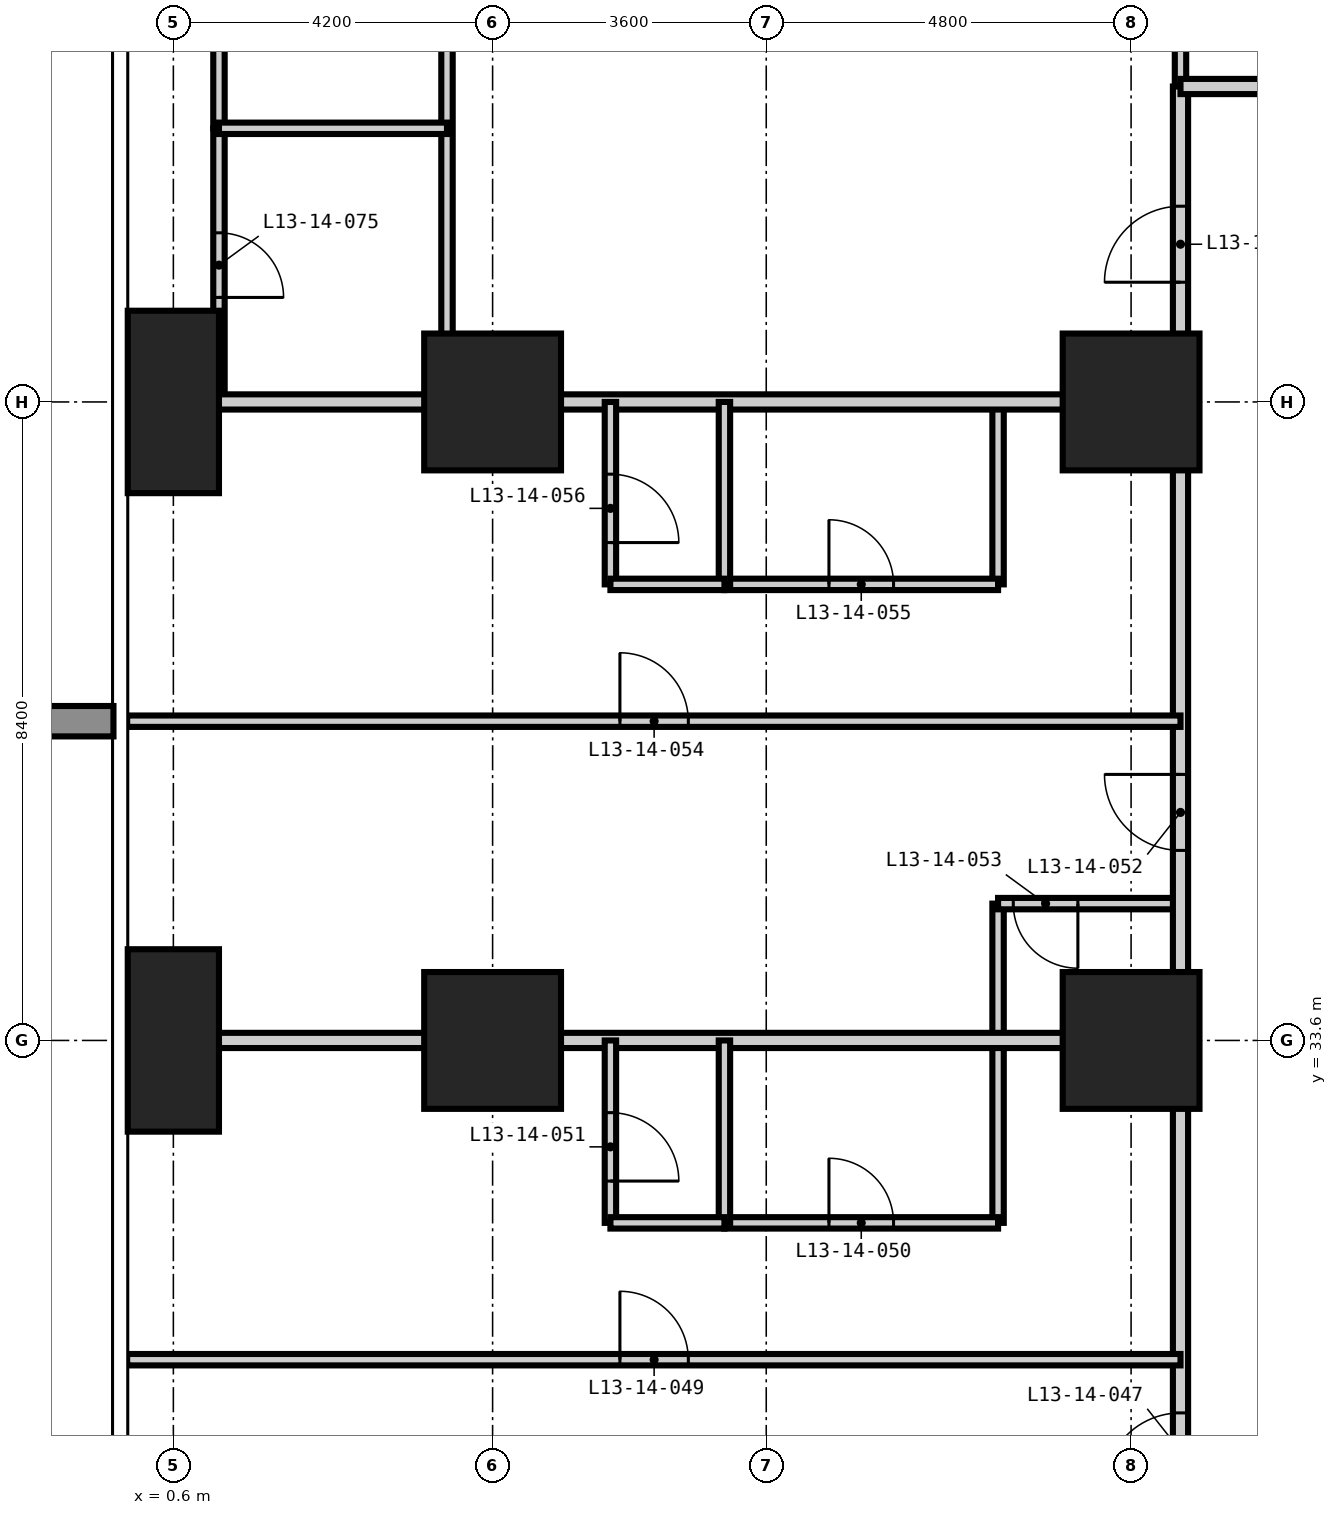
"""IFC4 building model, lengths in metres.
Left out: names, types, materials, properties, quantities, classifications, styles, units other than length and angle.
Written with IfcOpenShell. Run it as: python <this file> out.ifc"""

import sys

from ifc_helpers import new_model, si_unit, direction, frame, frame_2d, origin, origin_2d, place, context, subcontext, project, spatial, rectangle, extrude, element, fill, save


model = new_model("IFC4")
c1 = context("Model", 3, precision=1e-05, world=origin(), true_north=direction((0.0, 1.0)))
c2 = subcontext(c1, "Body", "Model", "MODEL_VIEW")
j1 = project(units=[si_unit("LENGTHUNIT", "METRE"), si_unit("PLANEANGLEUNIT", "RADIAN")], contexts=[c1])
p1 = place(None, origin())
s1 = spatial("IfcSite", under=j1, at=p1, CompositionType="ELEMENT")
p2 = place(p1, origin())
s2 = spatial("IfcBuilding", under=s1, at=p2, CompositionType="ELEMENT")
p3 = place(p2, frame((0.0, 0.0, 55.8)))
s3 = spatial("IfcBuildingStorey", under=s2, at=p3, CompositionType="ELEMENT", Elevation=55.8)
for number, where, z_axis, x_axis in (
    (1, (0.6, 33.6, -0.35), (0.0, 0.0, 1.0), (1.0, 0.0, 0.0)),
    (2, (0.6, 42.0, -0.35), (0.0, 0.0, 1.0), (1.0, 0.0, 0.0)),
):
    element("IfcColumn", number, at=place(p3, frame(where, z_axis=z_axis, x_axis=x_axis)), inside=s3, PredefinedType="COLUMN", context=c2, shape_type="SweptSolid", body=[
        extrude(rectangle(XDim=1.2, YDim=2.4, at=origin_2d()), origin(), (0.0, 0.0, 1.0), 3.6),
    ])
for number, where, z_axis, x_axis in (
    (3, (4.8, 33.6, -0.35), (0.0, 0.0, 1.0), (1.0, 0.0, 0.0)),
    (4, (4.8, 42.0, -0.35), (0.0, 0.0, 1.0), (1.0, 0.0, 0.0)),
    (5, (13.2, 33.6, -0.35), (0.0, 0.0, 1.0), (1.0, 0.0, 0.0)),
    (6, (13.2, 42.0, -0.35), (0.0, 0.0, 1.0), (1.0, 0.0, 0.0)),
):
    element("IfcColumn", number, at=place(p3, frame(where, z_axis=z_axis, x_axis=x_axis)), inside=s3, PredefinedType="COLUMN", context=c2, shape_type="SweptSolid", body=[
        extrude(rectangle(XDim=1.8, YDim=1.8, at=origin_2d()), origin(), (0.0, 0.0, 1.0), 3.6),
    ])
p4 = place(p3, frame((1.2, 42.0, 0.0), z_axis=(0.0, 0.0, 1.0), x_axis=(0.0, 1.0, 0.0)))
e7 = element("IfcWall", 7, at=p4, inside=s3, PredefinedType="PARTITIONING", context=c2, shape_type="SweptSolid", body=[
    extrude(rectangle(XDim=3.6, YDim=0.15, at=frame_2d((1.8, 0.0))), origin(), (0.0, 0.0, 1.0), 3.25),
])
p5 = place(p4, frame((1.375, 0.0, 0.0)))
e8 = element("IfcOpeningElement", 8, at=p5, cuts=e7, PredefinedType="OPENING", context=c2, shape_type="SweptSolid", body=[
    extrude(rectangle(XDim=0.85, YDim=2.1, at=frame_2d((0.425, 1.05))), frame((0.0, 0.085, 0.0), z_axis=(0.0, -1.0, 0.0), x_axis=(1.0, 0.0, 0.0)), (0.0, 0.0, 1.0), 0.17),
])
p6 = place(p3, frame((11.45, 31.2, 0.0), z_axis=(0.0, 0.0, 1.0), x_axis=(0.0, 1.0, 0.0)))
e9 = element("IfcWall", 9, at=p6, inside=s3, PredefinedType="PARTITIONING", context=c2, shape_type="SweptSolid", body=[
    extrude(rectangle(XDim=4.2, YDim=0.15, at=frame_2d((2.1, 0.0))), origin(), (0.0, 0.0, 1.0), 3.25),
])
p7 = place(p3, frame((11.45, 39.6, 0.0), z_axis=(0.0, 0.0, 1.0), x_axis=(0.0, 1.0, 0.0)))
e10 = element("IfcWall", 10, at=p7, inside=s3, PredefinedType="PARTITIONING", context=c2, shape_type="SweptSolid", body=[
    extrude(rectangle(XDim=2.4, YDim=0.15, at=frame_2d((1.2, 0.0))), origin(), (0.0, 0.0, 1.0), 3.25),
])
p8 = place(p3, frame((13.85, 46.15, 0.0), z_axis=(0.0, 0.0, 1.0), x_axis=(0.0, 1.0, 0.0)))
e11 = element("IfcWall", 11, at=p8, inside=s3, PredefinedType="PARTITIONING", context=c2, shape_type="SweptSolid", body=[
    extrude(rectangle(XDim=3.0, YDim=0.15, at=frame_2d((1.5, 0.0))), origin(), (0.0, 0.0, 1.0), 3.25),
])
p9 = place(p8, frame((1.075, 0.0, 0.0)))
e12 = element("IfcOpeningElement", 12, at=p9, cuts=e11, PredefinedType="OPENING", context=c2, shape_type="SweptSolid", body=[
    extrude(rectangle(XDim=0.85, YDim=2.1, at=frame_2d((0.425, 1.05))), frame((0.0, 0.085, 0.0), z_axis=(0.0, -1.0, 0.0), x_axis=(1.0, 0.0, 0.0)), (0.0, 0.0, 1.0), 0.17),
])
p10 = place(p3, frame((7.85, 31.2, 0.0), z_axis=(0.0, 0.0, 1.0), x_axis=(1.0, 0.0, 0.0)))
e13 = element("IfcWall", 13, at=p10, inside=s3, PredefinedType="PARTITIONING", context=c2, shape_type="SweptSolid", body=[
    extrude(rectangle(XDim=3.6, YDim=0.15, at=frame_2d((1.8, 0.0))), origin(), (0.0, 0.0, 1.0), 3.25),
])
p11 = place(p10, frame((1.375, 0.0, 0.0)))
e14 = element("IfcOpeningElement", 14, at=p11, cuts=e13, PredefinedType="OPENING", context=c2, shape_type="SweptSolid", body=[
    extrude(rectangle(XDim=0.85, YDim=2.1, at=frame_2d((0.425, 1.05))), frame((0.0, 0.085, 0.0), z_axis=(0.0, -1.0, 0.0), x_axis=(1.0, 0.0, 0.0)), (0.0, 0.0, 1.0), 0.17),
])
p12 = place(p3, frame((11.45, 35.4, 0.0), z_axis=(0.0, 0.0, 1.0), x_axis=(1.0, 0.0, 0.0)))
e15 = element("IfcWall", 15, at=p12, inside=s3, PredefinedType="PARTITIONING", context=c2, shape_type="SweptSolid", body=[
    extrude(rectangle(XDim=2.4, YDim=0.15, at=frame_2d((1.2, 0.0))), origin(), (0.0, 0.0, 1.0), 3.25),
])
p13 = place(p12, frame((0.2, 0.0, 0.0)))
e16 = element("IfcOpeningElement", 16, at=p13, cuts=e15, PredefinedType="OPENING", context=c2, shape_type="SweptSolid", body=[
    extrude(rectangle(XDim=0.85, YDim=2.1, at=frame_2d((0.425, 1.05))), frame((0.0, 0.085, 0.0), z_axis=(0.0, -1.0, 0.0), x_axis=(1.0, 0.0, 0.0)), (0.0, 0.0, 1.0), 0.17),
])
p14 = place(p3, frame((7.85, 39.6, 0.0), z_axis=(0.0, 0.0, 1.0), x_axis=(1.0, 0.0, 0.0)))
e17 = element("IfcWall", 17, at=p14, inside=s3, PredefinedType="PARTITIONING", context=c2, shape_type="SweptSolid", body=[
    extrude(rectangle(XDim=3.6, YDim=0.15, at=frame_2d((1.8, 0.0))), origin(), (0.0, 0.0, 1.0), 3.25),
])
p15 = place(p14, frame((1.375, 0.0, 0.0)))
e18 = element("IfcOpeningElement", 18, at=p15, cuts=e17, PredefinedType="OPENING", context=c2, shape_type="SweptSolid", body=[
    extrude(rectangle(XDim=0.85, YDim=2.1, at=frame_2d((0.425, 1.05))), frame((0.0, 0.085, 0.0), z_axis=(0.0, -1.0, 0.0), x_axis=(1.0, 0.0, 0.0)), (0.0, 0.0, 1.0), 0.17),
])
p16 = place(p3, frame((13.85, 13.85, 0.0), z_axis=(0.0, 0.0, 1.0), x_axis=(0.0, 1.0, 0.0)))
e19 = element("IfcWall", 19, at=p16, inside=s3, PredefinedType="PARTITIONING", context=c2, shape_type="SweptSolid", body=[
    extrude(rectangle(XDim=32.3, YDim=0.2, at=frame_2d((16.15, 0.0))), origin(), (0.0, 0.0, 1.0), 3.25),
])
p17 = place(p16, frame((5.45, 0.0, 0.0)))
e20 = element("IfcOpeningElement", 20, at=p17, cuts=e19, PredefinedType="OPENING", context=c2, shape_type="SweptSolid", body=[
    extrude(rectangle(XDim=1.0, YDim=2.2, at=frame_2d((0.5, 1.1))), frame((0.0, 0.11, 0.0), z_axis=(0.0, -1.0, 0.0), x_axis=(1.0, 0.0, 0.0)), (0.0, 0.0, 1.0), 0.22),
])
p18 = place(p16, frame((13.85, 0.0, 0.0)))
e21 = element("IfcOpeningElement", 21, at=p18, cuts=e19, PredefinedType="OPENING", context=c2, shape_type="SweptSolid", body=[
    extrude(rectangle(XDim=1.0, YDim=2.2, at=frame_2d((0.5, 1.1))), frame((0.0, 0.11, 0.0), z_axis=(0.0, -1.0, 0.0), x_axis=(1.0, 0.0, 0.0)), (0.0, 0.0, 1.0), 0.22),
])
p19 = place(p16, frame((22.25, 0.0, 0.0)))
e22 = element("IfcOpeningElement", 22, at=p19, cuts=e19, PredefinedType="OPENING", context=c2, shape_type="SweptSolid", body=[
    extrude(rectangle(XDim=1.0, YDim=2.2, at=frame_2d((0.5, 1.1))), frame((0.0, 0.11, 0.0), z_axis=(0.0, -1.0, 0.0), x_axis=(1.0, 0.0, 0.0)), (0.0, 0.0, 1.0), 0.22),
])
p20 = place(p16, frame((0.975, 0.0, 0.0)))
e23 = element("IfcOpeningElement", 23, at=p20, cuts=e19, PredefinedType="OPENING", context=c2, shape_type="SweptSolid", body=[
    extrude(rectangle(XDim=1.0, YDim=2.2, at=frame_2d((0.5, 1.1))), frame((0.0, 0.11, 0.0), z_axis=(0.0, -1.0, 0.0), x_axis=(1.0, 0.0, 0.0)), (0.0, 0.0, 1.0), 0.22),
])
p21 = place(p16, frame((29.725, 0.0, 0.0)))
e24 = element("IfcOpeningElement", 24, at=p21, cuts=e19, PredefinedType="OPENING", context=c2, shape_type="SweptSolid", body=[
    extrude(rectangle(XDim=1.0, YDim=2.2, at=frame_2d((0.5, 1.1))), frame((0.0, 0.11, 0.0), z_axis=(0.0, -1.0, 0.0), x_axis=(1.0, 0.0, 0.0)), (0.0, 0.0, 1.0), 0.22),
])
p22 = place(p3, frame((13.85, 46.15, 0.0), z_axis=(0.0, 0.0, 1.0), x_axis=(1.0, 0.0, 0.0)))
e25 = element("IfcWall", 25, at=p22, inside=s3, PredefinedType="PARTITIONING", context=c2, shape_type="SweptSolid", body=[
    extrude(rectangle(XDim=31.7, YDim=0.2, at=frame_2d((15.85, 0.0))), origin(), (0.0, 0.0, 1.0), 3.25),
])
p23 = place(p22, frame((6.65, 0.0, 0.0)))
e26 = element("IfcOpeningElement", 26, at=p23, cuts=e25, PredefinedType="OPENING", context=c2, shape_type="SweptSolid", body=[
    extrude(rectangle(XDim=1.0, YDim=2.2, at=frame_2d((0.5, 1.1))), frame((0.0, 0.11, 0.0), z_axis=(0.0, -1.0, 0.0), x_axis=(1.0, 0.0, 0.0)), (0.0, 0.0, 1.0), 0.22),
])
p24 = place(p22, frame((15.05, 0.0, 0.0)))
e27 = element("IfcOpeningElement", 27, at=p24, cuts=e25, PredefinedType="OPENING", context=c2, shape_type="SweptSolid", body=[
    extrude(rectangle(XDim=1.0, YDim=2.2, at=frame_2d((0.5, 1.1))), frame((0.0, 0.11, 0.0), z_axis=(0.0, -1.0, 0.0), x_axis=(1.0, 0.0, 0.0)), (0.0, 0.0, 1.0), 0.22),
])
p25 = place(p22, frame((23.45, 0.0, 0.0)))
e28 = element("IfcOpeningElement", 28, at=p25, cuts=e25, PredefinedType="OPENING", context=c2, shape_type="SweptSolid", body=[
    extrude(rectangle(XDim=1.0, YDim=2.2, at=frame_2d((0.5, 1.1))), frame((0.0, 0.11, 0.0), z_axis=(0.0, -1.0, 0.0), x_axis=(1.0, 0.0, 0.0)), (0.0, 0.0, 1.0), 0.22),
])
for number, where, z_axis, x_axis in (
    (29, (-0.008, 33.6, 0.0), (0.0, 0.0, 1.0), (1.0, 0.0, 0.0)),
    (30, (-0.008, 42.0, 0.0), (0.0, 0.0, 1.0), (1.0, 0.0, 0.0)),
):
    element("IfcWall", number, at=place(p3, frame(where, z_axis=z_axis, x_axis=x_axis)), inside=s3, PredefinedType="PARTITIONING", context=c2, shape_type="SweptSolid", body=[
        extrude(rectangle(XDim=13.858, YDim=0.2, at=frame_2d((6.929, 0.0))), origin(), (0.0, 0.0, 1.0), 3.25),
    ])
p26 = place(p3, frame((1.2, 45.6, 0.0), z_axis=(0.0, 0.0, 1.0), x_axis=(0.0, 1.0, 0.0)))
e31 = element("IfcWall", 31, at=p26, inside=s3, PredefinedType="PARTITIONING", context=c2, shape_type="SweptSolid", body=[
    extrude(rectangle(XDim=2.4, YDim=0.15, at=frame_2d((1.2, 0.0))), origin(), (0.0, 0.0, 1.0), 3.25),
])
p27 = place(p3, frame((4.2, 42.0, 0.0), z_axis=(0.0, 0.0, 1.0), x_axis=(0.0, 1.0, 0.0)))
e32 = element("IfcWall", 32, at=p27, inside=s3, PredefinedType="PARTITIONING", context=c2, shape_type="SweptSolid", body=[
    extrude(rectangle(XDim=16.808, YDim=0.15, at=frame_2d((8.404, 0.0))), origin(), (0.0, 0.0, 1.0), 3.25),
])
p28 = place(p27, frame((10.95, 0.0, 0.0)))
e33 = element("IfcOpeningElement", 33, at=p28, cuts=e32, PredefinedType="OPENING", context=c2, shape_type="SweptSolid", body=[
    extrude(rectangle(XDim=0.9, YDim=2.1, at=frame_2d((0.45, 1.05))), frame((0.0, 0.085, 0.0), z_axis=(0.0, -1.0, 0.0), x_axis=(1.0, 0.0, 0.0)), (0.0, 0.0, 1.0), 0.17),
])
p29 = place(p3, frame((6.35, 31.2, 0.0), z_axis=(0.0, 0.0, 1.0), x_axis=(0.0, 1.0, 0.0)))
e34 = element("IfcWall", 34, at=p29, inside=s3, PredefinedType="PARTITIONING", context=c2, shape_type="SweptSolid", body=[
    extrude(rectangle(XDim=2.4, YDim=0.15, at=frame_2d((1.2, 0.0))), origin(), (0.0, 0.0, 1.0), 3.25),
])
p30 = place(p29, frame((0.55, 0.0, 0.0)))
e35 = element("IfcOpeningElement", 35, at=p30, cuts=e34, PredefinedType="OPENING", context=c2, shape_type="SweptSolid", body=[
    extrude(rectangle(XDim=0.9, YDim=2.1, at=frame_2d((0.45, 1.05))), frame((0.0, 0.085, 0.0), z_axis=(0.0, -1.0, 0.0), x_axis=(1.0, 0.0, 0.0)), (0.0, 0.0, 1.0), 0.17),
])
p31 = place(p3, frame((6.35, 39.6, 0.0), z_axis=(0.0, 0.0, 1.0), x_axis=(0.0, 1.0, 0.0)))
e36 = element("IfcWall", 36, at=p31, inside=s3, PredefinedType="PARTITIONING", context=c2, shape_type="SweptSolid", body=[
    extrude(rectangle(XDim=2.4, YDim=0.15, at=frame_2d((1.2, 0.0))), origin(), (0.0, 0.0, 1.0), 3.25),
])
p32 = place(p31, frame((0.55, 0.0, 0.0)))
e37 = element("IfcOpeningElement", 37, at=p32, cuts=e36, PredefinedType="OPENING", context=c2, shape_type="SweptSolid", body=[
    extrude(rectangle(XDim=0.9, YDim=2.1, at=frame_2d((0.45, 1.05))), frame((0.0, 0.085, 0.0), z_axis=(0.0, -1.0, 0.0), x_axis=(1.0, 0.0, 0.0)), (0.0, 0.0, 1.0), 0.17),
])
p33 = place(p3, frame((7.85, 31.2, 0.0), z_axis=(0.0, 0.0, 1.0), x_axis=(0.0, 1.0, 0.0)))
e38 = element("IfcWall", 38, at=p33, inside=s3, PredefinedType="PARTITIONING", context=c2, shape_type="SweptSolid", body=[
    extrude(rectangle(XDim=2.4, YDim=0.15, at=frame_2d((1.2, 0.0))), origin(), (0.0, 0.0, 1.0), 3.25),
])
p34 = place(p3, frame((7.85, 39.6, 0.0), z_axis=(0.0, 0.0, 1.0), x_axis=(0.0, 1.0, 0.0)))
e39 = element("IfcWall", 39, at=p34, inside=s3, PredefinedType="PARTITIONING", context=c2, shape_type="SweptSolid", body=[
    extrude(rectangle(XDim=2.4, YDim=0.15, at=frame_2d((1.2, 0.0))), origin(), (0.0, 0.0, 1.0), 3.25),
])
p35 = place(p3, frame((-0.008, 29.4, 0.0), z_axis=(0.0, 0.0, 1.0), x_axis=(1.0, 0.0, 0.0)))
e40 = element("IfcWall", 40, at=p35, inside=s3, PredefinedType="PARTITIONING", context=c2, shape_type="SweptSolid", body=[
    extrude(rectangle(XDim=13.858, YDim=0.15, at=frame_2d((6.929, 0.0))), origin(), (0.0, 0.0, 1.0), 3.25),
])
p36 = place(p35, frame((6.483, 0.0, 0.0)))
e41 = element("IfcOpeningElement", 41, at=p36, cuts=e40, PredefinedType="OPENING", context=c2, shape_type="SweptSolid", body=[
    extrude(rectangle(XDim=0.9, YDim=2.1, at=frame_2d((0.45, 1.05))), frame((0.0, 0.085, 0.0), z_axis=(0.0, -1.0, 0.0), x_axis=(1.0, 0.0, 0.0)), (0.0, 0.0, 1.0), 0.17),
])
p37 = place(p3, frame((6.35, 31.2, 0.0), z_axis=(0.0, 0.0, 1.0), x_axis=(1.0, 0.0, 0.0)))
e42 = element("IfcWall", 42, at=p37, inside=s3, PredefinedType="PARTITIONING", context=c2, shape_type="SweptSolid", body=[
    extrude(rectangle(XDim=1.5, YDim=0.15, at=frame_2d((0.75, 0.0))), origin(), (0.0, 0.0, 1.0), 3.25),
])
p38 = place(p3, frame((-0.008, 37.8, 0.0), z_axis=(0.0, 0.0, 1.0), x_axis=(1.0, 0.0, 0.0)))
e43 = element("IfcWall", 43, at=p38, inside=s3, PredefinedType="PARTITIONING", context=c2, shape_type="SweptSolid", body=[
    extrude(rectangle(XDim=13.858, YDim=0.15, at=frame_2d((6.929, 0.0))), origin(), (0.0, 0.0, 1.0), 3.25),
])
p39 = place(p38, frame((6.483, 0.0, 0.0)))
e44 = element("IfcOpeningElement", 44, at=p39, cuts=e43, PredefinedType="OPENING", context=c2, shape_type="SweptSolid", body=[
    extrude(rectangle(XDim=0.9, YDim=2.1, at=frame_2d((0.45, 1.05))), frame((0.0, 0.085, 0.0), z_axis=(0.0, -1.0, 0.0), x_axis=(1.0, 0.0, 0.0)), (0.0, 0.0, 1.0), 0.17),
])
p40 = place(p3, frame((6.35, 39.6, 0.0), z_axis=(0.0, 0.0, 1.0), x_axis=(1.0, 0.0, 0.0)))
e45 = element("IfcWall", 45, at=p40, inside=s3, PredefinedType="PARTITIONING", context=c2, shape_type="SweptSolid", body=[
    extrude(rectangle(XDim=1.5, YDim=0.15, at=frame_2d((0.75, 0.0))), origin(), (0.0, 0.0, 1.0), 3.25),
])
p41 = place(p3, frame((1.2, 45.6, 0.0), z_axis=(0.0, 0.0, 1.0), x_axis=(1.0, 0.0, 0.0)))
e46 = element("IfcWall", 46, at=p41, inside=s3, PredefinedType="PARTITIONING", context=c2, shape_type="SweptSolid", body=[
    extrude(rectangle(XDim=3.0, YDim=0.15, at=frame_2d((1.5, 0.0))), origin(), (0.0, 0.0, 1.0), 3.25),
])
p42 = place(p18, origin())
e47 = element("IfcDoor", 47, at=p42, inside=s3, OperationType="SINGLE_SWING_LEFT", PredefinedType="DOOR", context=c2, shape_type="SweptSolid", body=[
    extrude(rectangle(XDim=1.0, YDim=2.2, at=frame_2d((0.5, 1.1))), frame((0.0, 0.025, 0.0), z_axis=(0.0, -1.0, 0.0), x_axis=(1.0, 0.0, 0.0)), (0.0, 0.0, 1.0), 0.05),
])
fill(e21, e47)
p43 = place(p36, origin())
e48 = element("IfcDoor", 48, at=p43, inside=s3, OperationType="SINGLE_SWING_LEFT", PredefinedType="DOOR", context=c2, shape_type="SweptSolid", body=[
    extrude(rectangle(XDim=0.9, YDim=2.1, at=frame_2d((0.45, 1.05))), frame((0.0, 0.025, 0.0), z_axis=(0.0, -1.0, 0.0), x_axis=(1.0, 0.0, 0.0)), (0.0, 0.0, 1.0), 0.05),
])
fill(e41, e48)
p44 = place(p11, origin())
e49 = element("IfcDoor", 49, at=p44, inside=s3, OperationType="SINGLE_SWING_LEFT", PredefinedType="DOOR", context=c2, shape_type="SweptSolid", body=[
    extrude(rectangle(XDim=0.85, YDim=2.1, at=frame_2d((0.425, 1.05))), frame((0.0, 0.025, 0.0), z_axis=(0.0, -1.0, 0.0), x_axis=(1.0, 0.0, 0.0)), (0.0, 0.0, 1.0), 0.05),
])
fill(e14, e49)
p45 = place(p30, frame((0.9, 0.0, 0.0), z_axis=(0.0, 0.0, 1.0), x_axis=(-1.0, 0.0, 0.0)))
e50 = element("IfcDoor", 50, at=p45, inside=s3, OperationType="SINGLE_SWING_RIGHT", PredefinedType="DOOR", context=c2, shape_type="SweptSolid", body=[
    extrude(rectangle(XDim=0.9, YDim=2.1, at=frame_2d((0.45, 1.05))), frame((0.0, 0.025, 0.0), z_axis=(0.0, -1.0, 0.0), x_axis=(1.0, 0.0, 0.0)), (0.0, 0.0, 1.0), 0.05),
])
fill(e35, e50)
p46 = place(p19, origin())
e51 = element("IfcDoor", 51, at=p46, inside=s3, OperationType="SINGLE_SWING_RIGHT", PredefinedType="DOOR", context=c2, shape_type="SweptSolid", body=[
    extrude(rectangle(XDim=1.0, YDim=2.2, at=frame_2d((0.5, 1.1))), frame((0.0, 0.025, 0.0), z_axis=(0.0, -1.0, 0.0), x_axis=(1.0, 0.0, 0.0)), (0.0, 0.0, 1.0), 0.05),
])
fill(e22, e51)
p47 = place(p13, frame((0.85, 0.0, 0.0), z_axis=(0.0, 0.0, 1.0), x_axis=(-1.0, 0.0, 0.0)))
e52 = element("IfcDoor", 52, at=p47, inside=s3, OperationType="SINGLE_SWING_LEFT", PredefinedType="DOOR", context=c2, shape_type="SweptSolid", body=[
    extrude(rectangle(XDim=0.85, YDim=2.1, at=frame_2d((0.425, 1.05))), frame((0.0, 0.025, 0.0), z_axis=(0.0, -1.0, 0.0), x_axis=(1.0, 0.0, 0.0)), (0.0, 0.0, 1.0), 0.05),
])
fill(e16, e52)
p48 = place(p39, origin())
e53 = element("IfcDoor", 53, at=p48, inside=s3, OperationType="SINGLE_SWING_LEFT", PredefinedType="DOOR", context=c2, shape_type="SweptSolid", body=[
    extrude(rectangle(XDim=0.9, YDim=2.1, at=frame_2d((0.45, 1.05))), frame((0.0, 0.025, 0.0), z_axis=(0.0, -1.0, 0.0), x_axis=(1.0, 0.0, 0.0)), (0.0, 0.0, 1.0), 0.05),
])
fill(e44, e53)
p49 = place(p15, origin())
e54 = element("IfcDoor", 54, at=p49, inside=s3, OperationType="SINGLE_SWING_LEFT", PredefinedType="DOOR", context=c2, shape_type="SweptSolid", body=[
    extrude(rectangle(XDim=0.85, YDim=2.1, at=frame_2d((0.425, 1.05))), frame((0.0, 0.025, 0.0), z_axis=(0.0, -1.0, 0.0), x_axis=(1.0, 0.0, 0.0)), (0.0, 0.0, 1.0), 0.05),
])
fill(e18, e54)
p50 = place(p32, frame((0.9, 0.0, 0.0), z_axis=(0.0, 0.0, 1.0), x_axis=(-1.0, 0.0, 0.0)))
e55 = element("IfcDoor", 55, at=p50, inside=s3, OperationType="SINGLE_SWING_RIGHT", PredefinedType="DOOR", context=c2, shape_type="SweptSolid", body=[
    extrude(rectangle(XDim=0.9, YDim=2.1, at=frame_2d((0.45, 1.05))), frame((0.0, 0.025, 0.0), z_axis=(0.0, -1.0, 0.0), x_axis=(1.0, 0.0, 0.0)), (0.0, 0.0, 1.0), 0.05),
])
fill(e37, e55)
p51 = place(p21, origin())
e56 = element("IfcDoor", 56, at=p51, inside=s3, OperationType="SINGLE_SWING_LEFT", PredefinedType="DOOR", context=c2, shape_type="SweptSolid", body=[
    extrude(rectangle(XDim=1.0, YDim=2.2, at=frame_2d((0.5, 1.1))), frame((0.0, 0.025, 0.0), z_axis=(0.0, -1.0, 0.0), x_axis=(1.0, 0.0, 0.0)), (0.0, 0.0, 1.0), 0.05),
])
fill(e24, e56)
p52 = place(p5, frame((0.85, 0.0, 0.0), z_axis=(0.0, 0.0, 1.0), x_axis=(-1.0, 0.0, 0.0)))
e57 = element("IfcDoor", 57, at=p52, inside=s3, OperationType="SINGLE_SWING_RIGHT", PredefinedType="DOOR", context=c2, shape_type="SweptSolid", body=[
    extrude(rectangle(XDim=0.85, YDim=2.1, at=frame_2d((0.425, 1.05))), frame((0.0, 0.025, 0.0), z_axis=(0.0, -1.0, 0.0), x_axis=(1.0, 0.0, 0.0)), (0.0, 0.0, 1.0), 0.05),
])
fill(e8, e57)
save(model, sys.argv[1])
